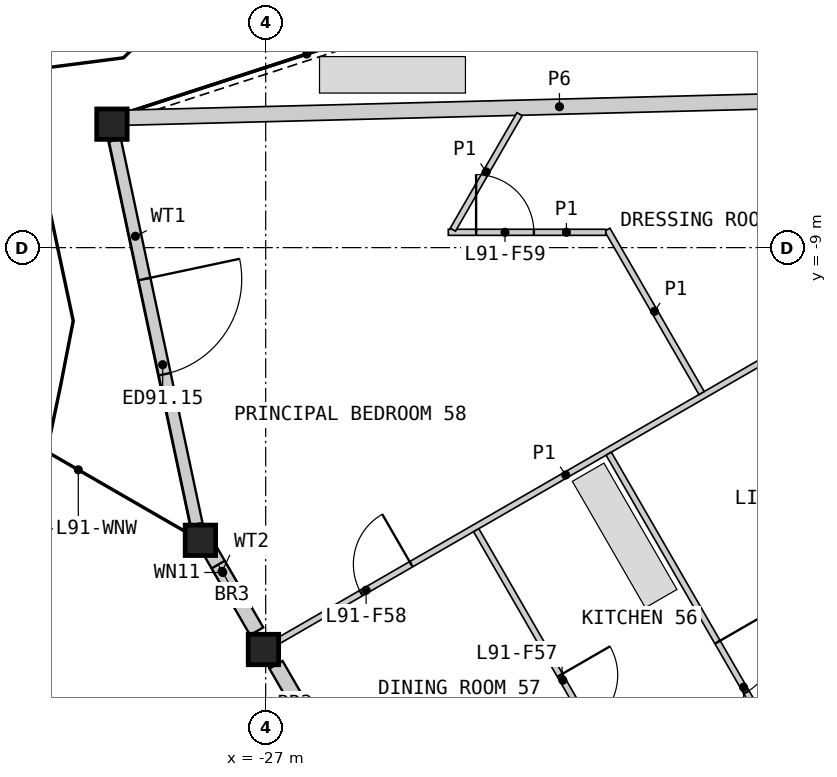
"""IFC4 building model, lengths in metres.
Left out: names, types, materials, properties, quantities, classifications, styles, units other than length and angle.
Written with IfcOpenShell. Run it as: python <this file> out.ifc"""

import sys

from ifc_helpers import new_model, si_unit, direction, frame, frame_2d, origin, origin_2d, place, context, subcontext, project, spatial, rectangle, hollow_rectangle, extrude, element, fill, save


model = new_model("IFC4")
c1 = context("Model", 3, precision=1e-05, world=origin(), true_north=direction((0.0, 1.0)))
c2 = subcontext(c1, "Body", "Model", "MODEL_VIEW")
j1 = project(units=[si_unit("LENGTHUNIT", "METRE"), si_unit("PLANEANGLEUNIT", "RADIAN")], contexts=[c1])
p1 = place(None, origin())
s1 = spatial("IfcSite", under=j1, at=p1, CompositionType="ELEMENT")
p2 = place(p1, origin())
s2 = spatial("IfcBuilding", under=s1, at=p2, CompositionType="ELEMENT")
p3 = place(p2, frame((0.0, 0.0, 398.4)))
s3 = spatial("IfcBuildingStorey", under=s2, at=p3, CompositionType="ELEMENT", Elevation=398.4)
for number, where, z_axis, x_axis in (
    (1, (-29.529, -6.969, 0.0), (0.0, 0.0, 1.0), (1.0, 0.0, 0.0)),
    (2, (-28.074, -13.814, 0.0), (0.0, 0.0, 1.0), (1.0, 0.0, 0.0)),
    (3, (-27.037, -15.61, 0.0), (0.0, 0.0, 1.0), (1.0, 0.0, 0.0)),
):
    element("IfcColumn", number, at=place(p3, frame(where, z_axis=z_axis, x_axis=x_axis)), inside=s3, PredefinedType="COLUMN", context=c2, shape_type="SweptSolid", body=[
        extrude(hollow_rectangle(XDim=0.5, YDim=0.5, WallThickness=0.03, at=origin_2d()), origin(), (0.0, 0.0, 1.0), 3.4),
    ])
p4 = place(p3, frame((-29.479, -7.235, 0.0), z_axis=(0.0, 0.0, 1.0), x_axis=(0.207932057694, -0.978143271399, 0.0)))
e4 = element("IfcWall", 4, at=p4, inside=s3, PredefinedType="SOLIDWALL", context=c2, shape_type="SweptSolid", body=[
    extrude(rectangle(XDim=6.453, YDim=0.2, at=frame_2d((3.227, 0.0))), origin(), (0.0, 0.0, 1.0), 2.634),
])
p5 = place(p4, frame((2.333, 0.0, 0.0)))
e5 = element("IfcOpeningElement", 5, at=p5, cuts=e4, PredefinedType="OPENING", context=c2, shape_type="SweptSolid", body=[
    extrude(rectangle(XDim=1.6, YDim=2.25, at=frame_2d((0.8, 1.125))), frame((0.0, 0.11, 0.0), z_axis=(0.0, -1.0, 0.0), x_axis=(1.0, 0.0, 0.0)), (0.0, 0.0, 1.0), 0.22),
])
p6 = place(p3, frame((-27.906, -13.997, 0.0), z_axis=(0.0, 0.0, 1.0), x_axis=(0.499931517724, -0.866064938435, 0.0)))
e6 = element("IfcWall", 6, at=p6, inside=s3, PredefinedType="SOLIDWALL", context=c2, shape_type="SweptSolid", body=[
    extrude(rectangle(XDim=1.516, YDim=0.25, at=frame_2d((0.758, 0.0))), origin(), (0.0, 0.0, 1.0), 2.634),
])
p7 = place(p6, frame((0.25, 0.0, 1.7)))
e7 = element("IfcOpeningElement", 7, at=p7, cuts=e6, PredefinedType="OPENING", context=c2, shape_type="SweptSolid", body=[
    extrude(rectangle(XDim=0.6, YDim=0.7, at=frame_2d((0.3, 0.35))), frame((0.0, 0.135, 0.0), z_axis=(0.0, -1.0, 0.0), x_axis=(1.0, 0.0, 0.0)), (0.0, 0.0, 1.0), 0.27),
])
p8 = place(p3, frame((-26.83, -15.861, 0.0), z_axis=(0.0, 0.0, 1.0), x_axis=(0.500048779063, -0.865997239347, 0.0)))
e8 = element("IfcWall", 8, at=p8, inside=s3, PredefinedType="SOLIDWALL", context=c2, shape_type="SweptSolid", body=[
    extrude(rectangle(XDim=1.511, YDim=0.25, at=frame_2d((0.755, 0.0))), origin(), (0.0, 0.0, 1.0), 2.634),
])
p9 = place(p3, frame((-29.269, -6.862, 0.0), z_axis=(0.0, 0.0, 1.0), x_axis=(0.999679020594, 0.025334872878, 0.0)))
e9 = element("IfcWall", 9, at=p9, inside=s3, PredefinedType="PARTITIONING", context=c2, shape_type="SweptSolid", body=[
    extrude(rectangle(XDim=14.204, YDim=0.25, at=frame_2d((7.102, 0.0))), origin(), (0.0, 0.0, 1.0), 2.33),
])
p10 = place(p3, frame((-20.318, -21.493, 0.0), z_axis=(0.0, 0.0, 1.0), x_axis=(0.52177126778, 0.853085426039, 0.0)))
e10 = element("IfcWall", 10, at=p10, inside=s3, PredefinedType="PARTITIONING", context=c2, shape_type="SweptSolid", body=[
    extrude(rectangle(XDim=13.708, YDim=0.25, at=frame_2d((6.854, 0.0))), origin(), (0.0, 0.0, 1.0), 2.33),
])
p11 = place(p3, frame((-26.777, -15.46, 0.0), z_axis=(0.0, 0.0, 1.0), x_axis=(0.866019680922, 0.500009912158, 0.0)))
e11 = element("IfcWall", 11, at=p11, inside=s3, PredefinedType="PARTITIONING", context=c2, shape_type="SweptSolid", body=[
    extrude(rectangle(XDim=10.881, YDim=0.1, at=frame_2d((5.44, 0.0))), origin(), (0.0, 0.0, 1.0), 2.33),
])
p12 = place(p11, frame((1.554, 0.0, 0.0)))
e12 = element("IfcOpeningElement", 12, at=p12, cuts=e11, PredefinedType="OPENING", context=c2, shape_type="SweptSolid", body=[
    extrude(rectangle(XDim=0.95, YDim=2.1, at=frame_2d((0.475, 1.05))), frame((0.0, 0.06, 0.0), z_axis=(0.0, -1.0, 0.0), x_axis=(1.0, 0.0, 0.0)), (0.0, 0.0, 1.0), 0.12),
])
p13 = place(p3, frame((-23.538, -13.647, 0.0), z_axis=(0.0, 0.0, 1.0), x_axis=(0.499977115003, -0.86603861604, 0.0)))
e13 = element("IfcWall", 13, at=p13, inside=s3, PredefinedType="PARTITIONING", context=c2, shape_type="SweptSolid", body=[
    extrude(rectangle(XDim=7.662, YDim=0.1, at=frame_2d((3.831, 0.0))), origin(), (0.0, 0.0, 1.0), 2.33),
])
p14 = place(p13, frame((2.755, 0.0, 0.0)))
e14 = element("IfcOpeningElement", 14, at=p14, cuts=e13, PredefinedType="OPENING", context=c2, shape_type="SweptSolid", body=[
    extrude(rectangle(XDim=0.95, YDim=2.1, at=frame_2d((0.475, 1.05))), frame((0.0, 0.06, 0.0), z_axis=(0.0, -1.0, 0.0), x_axis=(1.0, 0.0, 0.0)), (0.0, 0.0, 1.0), 0.12),
])
p15 = place(p3, frame((-21.359, -12.389, 0.0), z_axis=(0.0, 0.0, 1.0), x_axis=(0.500006767202, -0.866021496703, 0.0)))
e15 = element("IfcWall", 15, at=p15, inside=s3, PredefinedType="PARTITIONING", context=c2, shape_type="SweptSolid", body=[
    extrude(rectangle(XDim=6.293, YDim=0.1, at=frame_2d((3.147, 0.0))), origin(), (0.0, 0.0, 1.0), 2.33),
])
p16 = place(p15, frame((3.58, 0.0, 0.0)))
e16 = element("IfcOpeningElement", 16, at=p16, cuts=e15, PredefinedType="OPENING", context=c2, shape_type="SweptSolid", body=[
    extrude(rectangle(XDim=0.95, YDim=2.1, at=frame_2d((0.475, 1.05))), frame((0.0, 0.06, 0.0), z_axis=(0.0, -1.0, 0.0), x_axis=(1.0, 0.0, 0.0)), (0.0, 0.0, 1.0), 0.12),
])
p17 = place(p3, frame((-21.382, -8.705, 0.0), z_axis=(0.0, 0.0, 1.0), x_axis=(0.50001536203, -0.866016534331, 0.0)))
e17 = element("IfcWall", 17, at=p17, inside=s3, PredefinedType="PARTITIONING", context=c2, shape_type="SweptSolid", body=[
    extrude(rectangle(XDim=3.103, YDim=0.1, at=frame_2d((1.551, 0.0))), origin(), (0.0, 0.0, 1.0), 2.33),
])
p18 = place(p3, frame((-23.997, -8.748, 0.0), z_axis=(0.0, 0.0, 1.0), x_axis=(1.0, 0.0, 0.0)))
e18 = element("IfcWall", 18, at=p18, inside=s3, PredefinedType="PARTITIONING", context=c2, shape_type="SweptSolid", body=[
    extrude(rectangle(XDim=2.59, YDim=0.1, at=frame_2d((1.295, 0.0))), origin(), (0.0, 0.0, 1.0), 2.33),
])
p19 = place(p18, frame((0.457, 0.0, 0.0)))
e19 = element("IfcOpeningElement", 19, at=p19, cuts=e18, PredefinedType="OPENING", context=c2, shape_type="SweptSolid", body=[
    extrude(rectangle(XDim=0.95, YDim=2.1, at=frame_2d((0.475, 1.05))), frame((0.0, 0.06, 0.0), z_axis=(0.0, -1.0, 0.0), x_axis=(1.0, 0.0, 0.0)), (0.0, 0.0, 1.0), 0.12),
])
p20 = place(p3, frame((-23.922, -8.705, 0.0), z_axis=(0.0, 0.0, 1.0), x_axis=(0.50001794124, 0.866015045157, 0.0)))
e20 = element("IfcWall", 20, at=p20, inside=s3, PredefinedType="PARTITIONING", context=c2, shape_type="SweptSolid", body=[
    extrude(rectangle(XDim=2.193, YDim=0.1, at=frame_2d((1.097, 0.0))), origin(), (0.0, 0.0, 1.0), 2.33),
])
p21 = place(p5, origin())
e21 = element("IfcDoor", 21, at=p21, inside=s3, OperationType="DOUBLE_DOOR_SINGLE_SWING", PredefinedType="DOOR", context=c2, shape_type="SweptSolid", body=[
    extrude(rectangle(XDim=1.6, YDim=2.25, at=frame_2d((0.8, 1.125))), frame((0.0, 0.025, 0.0), z_axis=(0.0, -1.0, 0.0), x_axis=(1.0, 0.0, 0.0)), (0.0, 0.0, 1.0), 0.05),
])
fill(e5, e21)
p22 = place(p7, origin())
e22 = element("IfcWindow", 22, at=p22, inside=s3, PartitioningType="SINGLE_PANEL", PredefinedType="WINDOW", context=c2, shape_type="SweptSolid", body=[
    extrude(rectangle(XDim=0.6, YDim=0.7, at=frame_2d((0.3, 0.35))), frame((0.0, 0.03, 0.0), z_axis=(0.0, -1.0, 0.0), x_axis=(1.0, 0.0, 0.0)), (0.0, 0.0, 1.0), 0.06),
])
fill(e7, e22)
p23 = place(p16, origin())
e23 = element("IfcDoor", 23, at=p23, inside=s3, OperationType="SINGLE_SWING_LEFT", PredefinedType="DOOR", context=c2, shape_type="SweptSolid", body=[
    extrude(rectangle(XDim=0.95, YDim=2.1, at=frame_2d((0.475, 1.05))), frame((0.0, 0.025, 0.0), z_axis=(0.0, -1.0, 0.0), x_axis=(1.0, 0.0, 0.0)), (0.0, 0.0, 1.0), 0.05),
])
fill(e16, e23)
p24 = place(p14, origin())
e24 = element("IfcDoor", 24, at=p24, inside=s3, OperationType="SINGLE_SWING_LEFT", PredefinedType="DOOR", context=c2, shape_type="SweptSolid", body=[
    extrude(rectangle(XDim=0.95, YDim=2.1, at=frame_2d((0.475, 1.05))), frame((0.0, 0.025, 0.0), z_axis=(0.0, -1.0, 0.0), x_axis=(1.0, 0.0, 0.0)), (0.0, 0.0, 1.0), 0.05),
])
fill(e14, e24)
p25 = place(p12, origin())
e25 = element("IfcDoor", 25, at=p25, inside=s3, OperationType="SINGLE_SWING_RIGHT", PredefinedType="DOOR", context=c2, shape_type="SweptSolid", body=[
    extrude(rectangle(XDim=0.95, YDim=2.1, at=frame_2d((0.475, 1.05))), frame((0.0, 0.025, 0.0), z_axis=(0.0, -1.0, 0.0), x_axis=(1.0, 0.0, 0.0)), (0.0, 0.0, 1.0), 0.05),
])
fill(e12, e25)
p26 = place(p19, origin())
e26 = element("IfcDoor", 26, at=p26, inside=s3, OperationType="SINGLE_SWING_LEFT", PredefinedType="DOOR", context=c2, shape_type="SweptSolid", body=[
    extrude(rectangle(XDim=0.95, YDim=2.1, at=frame_2d((0.475, 1.05))), frame((0.0, 0.025, 0.0), z_axis=(0.0, -1.0, 0.0), x_axis=(1.0, 0.0, 0.0)), (0.0, 0.0, 1.0), 0.05),
])
fill(e19, e26)
save(model, sys.argv[1])
